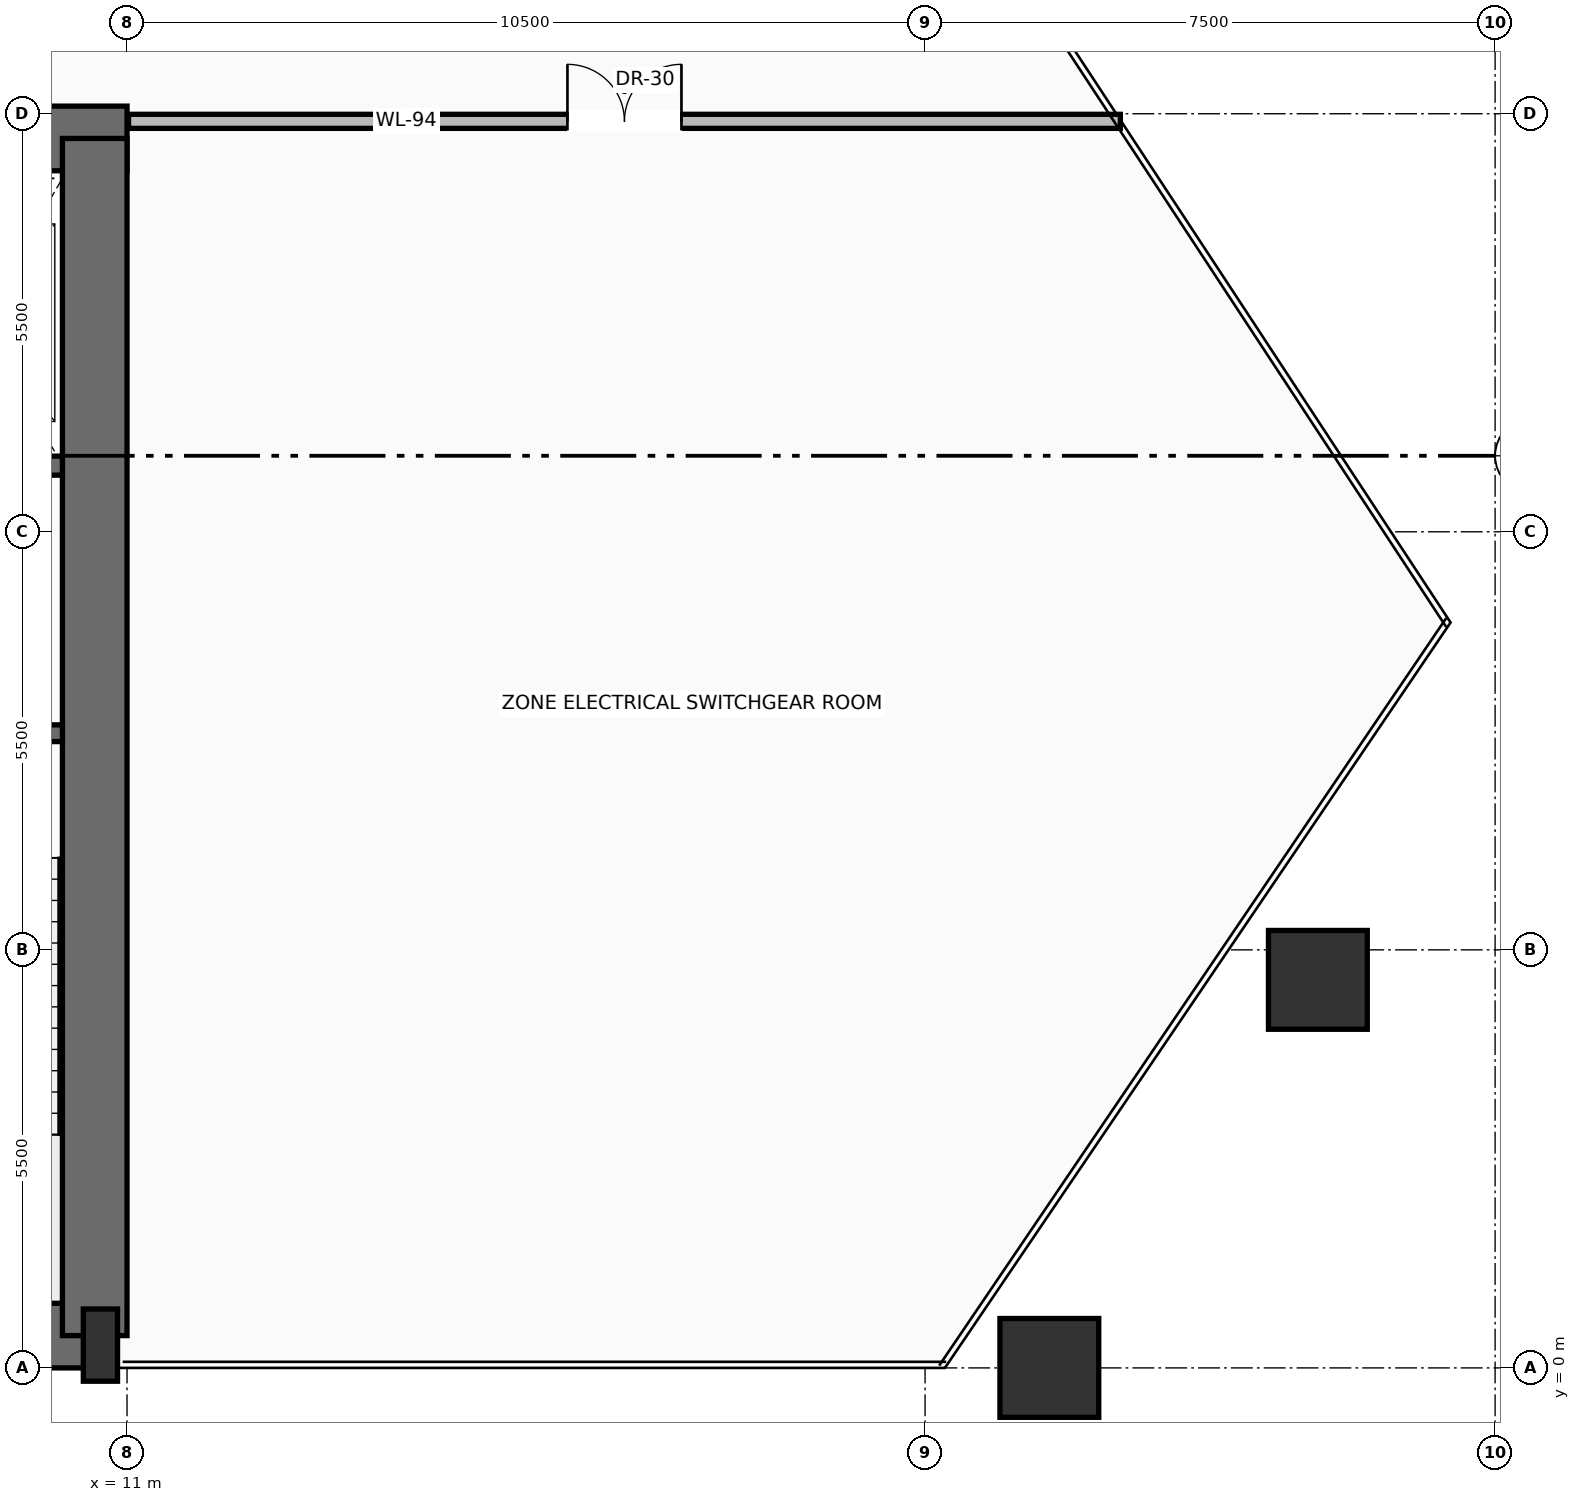
"""IFC4 building model, lengths in metres.
Left out: names, types, materials, properties, quantities, classifications, styles, units other than length and angle.
Written with IfcOpenShell. Run it as: python <this file> out.ifc"""

import sys

from ifc_helpers import new_model, si_unit, direction, frame, frame_2d, origin, origin_2d, place, context, subcontext, project, spatial, rectangle, hollow_rectangle, extrude, source, transform, mapped, element, fill, save


model = new_model("IFC4")
c1 = context("Model", 3, precision=1e-05, world=origin(), true_north=direction((0.0, 1.0)))
c2 = subcontext(c1, "Body", "Model", "MODEL_VIEW")
j1 = project(units=[si_unit("LENGTHUNIT", "METRE"), si_unit("PLANEANGLEUNIT", "RADIAN")], contexts=[c1])
p1 = place(None, origin())
s1 = spatial("IfcSite", under=j1, at=p1, CompositionType="ELEMENT")
p2 = place(p1, origin())
s2 = spatial("IfcBuilding", under=s1, at=p2, CompositionType="ELEMENT")
p3 = place(p2, frame((0.0, 0.0, 71.9)))
s3 = spatial("IfcBuildingStorey", under=s2, at=p3, CompositionType="ELEMENT", Elevation=71.9)
p4 = place(p3, frame((-10.65, 0.425, 0.0), z_axis=(0.0, 0.0, 1.0), x_axis=(1.0, 0.0, 0.0)))
e1 = element("IfcWall", 1, at=p4, inside=s3, PredefinedType="SHEAR", context=c2, shape_type="SweptSolid", body=[
    extrude(rectangle(XDim=21.3, YDim=0.85, at=frame_2d((10.65, 0.0))), origin(), (0.0, 0.0, 1.0), 4.45),
])
p5 = place(p3, frame((-11.0, 16.175, 0.0), z_axis=(0.0, 0.0, 1.0), x_axis=(1.0, 0.0, 0.0)))
e2 = element("IfcWall", 2, at=p5, inside=s3, PredefinedType="SHEAR", context=c2, shape_type="SweptSolid", body=[
    extrude(rectangle(XDim=22.0, YDim=0.85, at=frame_2d((11.0, 0.0))), origin(), (0.0, 0.0, 1.0), 4.45),
])
p6 = place(p5, frame((3.57, 0.0, 0.0)))
e3 = element("IfcOpeningElement", 3, at=p6, cuts=e2, PredefinedType="OPENING", context=c2, shape_type="SweptSolid", body=[
    extrude(rectangle(XDim=1.3, YDim=2.3, at=frame_2d((0.65, 1.15))), frame((0.0, 0.435, 0.0), z_axis=(0.0, -1.0, 0.0), x_axis=(1.0, 0.0, 0.0)), (0.0, 0.0, 1.0), 0.87),
])
p7 = place(p5, frame((10.0, 0.0, 0.0)))
e4 = element("IfcOpeningElement", 4, at=p7, cuts=e2, PredefinedType="OPENING", context=c2, shape_type="SweptSolid", body=[
    extrude(rectangle(XDim=2.0, YDim=2.4, at=frame_2d((1.0, 1.2))), frame((0.0, 0.435, 0.0), z_axis=(0.0, -1.0, 0.0), x_axis=(1.0, 0.0, 0.0)), (0.0, 0.0, 1.0), 0.87),
])
p8 = place(p3, frame((10.575, 0.425, 0.0), z_axis=(0.0, 0.0, 1.0), x_axis=(0.0, 1.0, 0.0)))
e5 = element("IfcWall", 5, at=p8, inside=s3, PredefinedType="SHEAR", context=c2, shape_type="SweptSolid", body=[
    extrude(rectangle(XDim=15.75, YDim=0.85, at=frame_2d((7.875, 0.0))), origin(), (0.0, 0.0, 1.0), 4.45),
])
m1 = source(origin(), c2, "Body", "SweptSolid", [
    extrude(rectangle(XDim=0.45, YDim=0.95, at=origin_2d()), origin(), (0.0, 0.0, 1.0), 4.7),
])
p9 = place(p3, frame((10.65, 0.3, 0.0), z_axis=(0.0, 0.0, 1.0), x_axis=(1.0, 0.0, 0.0)))
e6 = element("IfcColumn", 6, at=p9, inside=s3, PredefinedType="PILASTER", context=c2, shape_type="MappedRepresentation", body=[
    mapped(m1, transform((0.0, 0.0, 0.0), scale=1.0)),
])
m2 = source(origin(), c2, "Body", "SweptSolid", [
    extrude(hollow_rectangle(XDim=1.3, YDim=1.3, WallThickness=0.065, at=origin_2d()), origin(), (0.0, 0.0, 1.0), 4.692),
])
p10 = place(p3, frame((23.135, 0.0, 0.004), z_axis=(0.01373725483, 0.0, 0.999905639463), x_axis=(0.0, 1.0, 0.0)))
e7 = element("IfcColumn", 7, at=p10, inside=s3, PredefinedType="COLUMN", context=c2, shape_type="MappedRepresentation", body=[
    mapped(m2, transform((0.0, 0.0, 0.0), scale=1.0)),
])
m3 = source(origin(), c2, "Body", "SweptSolid", [
    extrude(hollow_rectangle(XDim=1.3, YDim=1.3, WallThickness=0.065, at=origin_2d()), origin(), (0.0, 0.0, 1.0), 4.692),
])
p11 = place(p3, frame((26.668, 5.105, 0.004), z_axis=(0.001560990035, -0.016286329365, 0.999866150435), x_axis=(0.995438117406, 0.095409404224, 0.0)))
e8 = element("IfcColumn", 8, at=p11, inside=s3, PredefinedType="COLUMN", context=c2, shape_type="MappedRepresentation", body=[
    mapped(m3, transform((0.0, 0.0, 0.0), scale=1.0)),
])
p12 = place(p3, frame((10.15, 8.35, 0.0), z_axis=(0.0, 0.0, 1.0), x_axis=(-1.0, 0.0, 0.0)))
e9 = element("IfcWall", 9, at=p12, inside=s3, PredefinedType="SOLIDWALL", context=c2, shape_type="SweptSolid", body=[
    extrude(rectangle(XDim=4.65, YDim=0.22, at=frame_2d((2.325, 0.0))), origin(), (0.0, 0.0, 1.0), 4.45),
])
p13 = place(p12, frame((1.0, 0.0, 0.0)))
e10 = element("IfcOpeningElement", 10, at=p13, cuts=e9, PredefinedType="OPENING", context=c2, shape_type="SweptSolid", body=[
    extrude(rectangle(XDim=1.15, YDim=2.2, at=frame_2d((0.575, 1.1))), frame((0.0, 0.12, 0.0), z_axis=(0.0, -1.0, 0.0), x_axis=(1.0, 0.0, 0.0)), (0.0, 0.0, 1.0), 0.24),
])
p14 = place(p3, frame((10.15, 11.87, 0.0), z_axis=(0.0, 0.0, 1.0), x_axis=(-1.0, 0.0, 0.0)))
e11 = element("IfcWall", 11, at=p14, inside=s3, PredefinedType="SOLIDWALL", context=c2, shape_type="SweptSolid", body=[
    extrude(rectangle(XDim=4.65, YDim=0.25, at=frame_2d((2.325, 0.0))), origin(), (0.0, 0.0, 1.0), 4.45),
])
p15 = place(p14, frame((0.5, 0.0, 0.0)))
e12 = element("IfcOpeningElement", 12, at=p15, cuts=e11, PredefinedType="OPENING", context=c2, shape_type="SweptSolid", body=[
    extrude(rectangle(XDim=1.2, YDim=2.25, at=frame_2d((0.6, 1.125))), frame((0.0, 0.135, 0.0), z_axis=(0.0, -1.0, 0.0), x_axis=(1.0, 0.0, 0.0)), (0.0, 0.0, 1.0), 0.27),
])
p16 = place(p3, frame((11.02, 16.4, 0.0), z_axis=(0.0, 0.0, 1.0), x_axis=(1.0, 0.0, 0.0)))
e13 = element("IfcWall", 13, at=p16, inside=s3, PredefinedType="PARTITIONING", context=c2, shape_type="SweptSolid", body=[
    extrude(rectangle(XDim=13.049, YDim=0.185, at=frame_2d((6.524, 0.0))), origin(), (0.0, 0.0, 1.0), 4.442),
])
p17 = place(p16, frame((5.775, 0.0, 0.0)))
e14 = element("IfcOpeningElement", 14, at=p17, cuts=e13, PredefinedType="OPENING", context=c2, shape_type="SweptSolid", body=[
    extrude(rectangle(XDim=1.5, YDim=2.25, at=frame_2d((0.75, 1.125))), frame((0.0, 0.103, 0.0), z_axis=(0.0, -1.0, 0.0), x_axis=(1.0, 0.0, 0.0)), (0.0, 0.0, 1.0), 0.205),
])
m4 = source(origin(), c2, "Body", "SweptSolid", [
    extrude(rectangle(XDim=1.5, YDim=2.25, at=frame_2d((0.75, 1.125))), frame((0.0, 0.025, 0.0), z_axis=(0.0, -1.0, 0.0), x_axis=(1.0, 0.0, 0.0)), (0.0, 0.0, 1.0), 0.05),
])
p18 = place(p17, origin())
e15 = element("IfcDoor", 15, at=p18, inside=s3, OperationType="DOUBLE_DOOR_SINGLE_SWING", PredefinedType="DOOR", context=c2, shape_type="MappedRepresentation", body=[
    mapped(m4, transform((0.0, 0.0, 0.0), scale=1.0)),
])
fill(e14, e15)
save(model, sys.argv[1])
